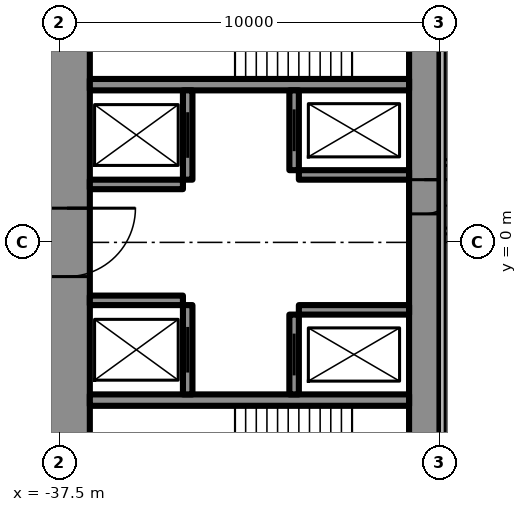
"""IFC4 building model, lengths in metres.
Left out: names, types, materials, properties, quantities, classifications, styles, units other than length and angle.
Written with IfcOpenShell. Run it as: python <this file> out.ifc"""

import sys

from ifc_helpers import new_model, si_unit, direction, frame, frame_2d, origin, place, context, subcontext, project, spatial, rectangle, extrude, element, fill, save


model = new_model("IFC4")
c1 = context("Model", 3, precision=1e-05, world=origin(), true_north=direction((0.0, 1.0)))
c2 = subcontext(c1, "Body", "Model", "MODEL_VIEW")
j1 = project(units=[si_unit("LENGTHUNIT", "METRE"), si_unit("PLANEANGLEUNIT", "RADIAN")], contexts=[c1])
p1 = place(None, origin())
s1 = spatial("IfcSite", under=j1, at=p1, CompositionType="ELEMENT")
p2 = place(p1, origin())
s2 = spatial("IfcBuilding", under=s1, at=p2, CompositionType="ELEMENT")
p3 = place(p2, frame((0.0, 0.0, 247.7)))
s3 = spatial("IfcBuildingStorey", under=s2, at=p3, CompositionType="ELEMENT", Elevation=247.7)
p4 = place(p3, frame((-27.9, 8.6, 0.0), z_axis=(0.0, 0.0, 1.0), x_axis=(0.0, -1.0, 0.0)))
e1 = element("IfcWall", 1, at=p4, inside=s3, PredefinedType="SHEAR", context=c2, shape_type="SweptSolid", body=[
    extrude(rectangle(XDim=17.2, YDim=0.8, at=frame_2d((8.6, 0.0))), origin(), (0.0, 0.0, 1.0), 4.2),
])
p5 = place(p4, frame((6.95, 0.0, 0.0)))
e2 = element("IfcOpeningElement", 2, at=p5, cuts=e1, PredefinedType="OPENING", context=c2, shape_type="SweptSolid", body=[
    extrude(rectangle(XDim=0.9, YDim=2.2, at=frame_2d((0.45, 1.1))), frame((0.0, 0.41, 0.0), z_axis=(0.0, -1.0, 0.0), x_axis=(1.0, 0.0, 0.0)), (0.0, 0.0, 1.0), 0.82),
])
p6 = place(p3, frame((-37.3, 8.6, 0.0), z_axis=(0.0, 0.0, 1.0), x_axis=(0.0, -1.0, 0.0)))
e3 = element("IfcWall", 3, at=p6, inside=s3, PredefinedType="SHEAR", context=c2, shape_type="SweptSolid", body=[
    extrude(rectangle(XDim=17.2, YDim=1.2, at=frame_2d((8.6, 0.0))), origin(), (0.0, 0.0, 1.0), 4.2),
])
p7 = place(p6, frame((7.7, 0.0, 0.0)))
e4 = element("IfcOpeningElement", 4, at=p7, cuts=e3, PredefinedType="OPENING", context=c2, shape_type="SweptSolid", body=[
    extrude(rectangle(XDim=1.8, YDim=2.2, at=frame_2d((0.9, 1.1))), frame((0.0, 0.61, 0.0), z_axis=(0.0, -1.0, 0.0), x_axis=(1.0, 0.0, 0.0)), (0.0, 0.0, 1.0), 1.22),
])
for number, where, z_axis, x_axis in (
    (5, (-28.3, 4.15, 0.0), (0.0, 0.0, 1.0), (-1.0, 0.0, 0.0)),
    (6, (-28.3, -4.15, 0.0), (0.0, 0.0, 1.0), (-1.0, 0.0, 0.0)),
):
    element("IfcWall", number, at=place(p3, frame(where, z_axis=z_axis, x_axis=x_axis)), inside=s3, PredefinedType="SHEAR", context=c2, shape_type="SweptSolid", body=[
        extrude(rectangle(XDim=8.4, YDim=0.3, at=frame_2d((4.2, 0.0))), origin(), (0.0, 0.0, 1.0), 4.2),
    ])
p8 = place(p3, frame((-31.325, 4.0, 0.0), z_axis=(0.0, 0.0, 1.0), x_axis=(0.0, -1.0, 0.0)))
e7 = element("IfcWall", 7, at=p8, inside=s3, PredefinedType="SHEAR", context=c2, shape_type="SweptSolid", body=[
    extrude(rectangle(XDim=2.1, YDim=0.25, at=frame_2d((1.05, 0.0))), origin(), (0.0, 0.0, 1.0), 4.2),
])
p9 = place(p8, frame((0.5, 0.0, 0.0)))
e8 = element("IfcOpeningElement", 8, at=p9, cuts=e7, PredefinedType="OPENING", context=c2, shape_type="SweptSolid", body=[
    extrude(rectangle(XDim=1.1, YDim=2.2, at=frame_2d((0.55, 1.1))), frame((0.0, 0.135, 0.0), z_axis=(0.0, -1.0, 0.0), x_axis=(1.0, 0.0, 0.0)), (0.0, 0.0, 1.0), 0.27),
])
p10 = place(p3, frame((-34.125, 4.0, 0.0), z_axis=(0.0, 0.0, 1.0), x_axis=(0.0, -1.0, 0.0)))
e9 = element("IfcWall", 9, at=p10, inside=s3, PredefinedType="SHEAR", context=c2, shape_type="SweptSolid", body=[
    extrude(rectangle(XDim=2.35, YDim=0.25, at=frame_2d((1.175, 0.0))), origin(), (0.0, 0.0, 1.0), 4.2),
])
p11 = place(p10, frame((0.575, 0.0, 0.0)))
e10 = element("IfcOpeningElement", 10, at=p11, cuts=e9, PredefinedType="OPENING", context=c2, shape_type="SweptSolid", body=[
    extrude(rectangle(XDim=1.2, YDim=2.2, at=frame_2d((0.6, 1.1))), frame((0.0, 0.135, 0.0), z_axis=(0.0, -1.0, 0.0), x_axis=(1.0, 0.0, 0.0)), (0.0, 0.0, 1.0), 0.27),
])
p12 = place(p3, frame((-28.3, 1.775, 0.0), z_axis=(0.0, 0.0, 1.0), x_axis=(-1.0, 0.0, 0.0)))
e11 = element("IfcWall", 11, at=p12, inside=s3, PredefinedType="SHEAR", context=c2, shape_type="SweptSolid", body=[
    extrude(rectangle(XDim=2.9, YDim=0.25, at=frame_2d((1.45, 0.0))), origin(), (0.0, 0.0, 1.0), 4.2),
])
p13 = place(p3, frame((-34.25, 1.525, 0.0), z_axis=(0.0, 0.0, 1.0), x_axis=(-1.0, 0.0, 0.0)))
e12 = element("IfcWall", 12, at=p13, inside=s3, PredefinedType="SHEAR", context=c2, shape_type="SweptSolid", body=[
    extrude(rectangle(XDim=2.45, YDim=0.25, at=frame_2d((1.225, 0.0))), origin(), (0.0, 0.0, 1.0), 4.2),
])
p14 = place(p3, frame((-31.325, -1.9, 0.0), z_axis=(0.0, 0.0, 1.0), x_axis=(0.0, -1.0, 0.0)))
e13 = element("IfcWall", 13, at=p14, inside=s3, PredefinedType="SHEAR", context=c2, shape_type="SweptSolid", body=[
    extrude(rectangle(XDim=2.1, YDim=0.25, at=frame_2d((1.05, 0.0))), origin(), (0.0, 0.0, 1.0), 4.2),
])
p15 = place(p14, frame((0.5, 0.0, 0.0)))
e14 = element("IfcOpeningElement", 14, at=p15, cuts=e13, PredefinedType="OPENING", context=c2, shape_type="SweptSolid", body=[
    extrude(rectangle(XDim=1.1, YDim=2.2, at=frame_2d((0.55, 1.1))), frame((0.0, 0.135, 0.0), z_axis=(0.0, -1.0, 0.0), x_axis=(1.0, 0.0, 0.0)), (0.0, 0.0, 1.0), 0.27),
])
p16 = place(p3, frame((-34.125, -1.65, 0.0), z_axis=(0.0, 0.0, 1.0), x_axis=(0.0, -1.0, 0.0)))
e15 = element("IfcWall", 15, at=p16, inside=s3, PredefinedType="SHEAR", context=c2, shape_type="SweptSolid", body=[
    extrude(rectangle(XDim=2.35, YDim=0.25, at=frame_2d((1.175, 0.0))), origin(), (0.0, 0.0, 1.0), 4.2),
])
p17 = place(p16, frame((0.575, 0.0, 0.0)))
e16 = element("IfcOpeningElement", 16, at=p17, cuts=e15, PredefinedType="OPENING", context=c2, shape_type="SweptSolid", body=[
    extrude(rectangle(XDim=1.2, YDim=2.2, at=frame_2d((0.6, 1.1))), frame((0.0, 0.135, 0.0), z_axis=(0.0, -1.0, 0.0), x_axis=(1.0, 0.0, 0.0)), (0.0, 0.0, 1.0), 0.27),
])
p18 = place(p3, frame((-28.3, -1.775, 0.0), z_axis=(0.0, 0.0, 1.0), x_axis=(-1.0, 0.0, 0.0)))
e17 = element("IfcWall", 17, at=p18, inside=s3, PredefinedType="SHEAR", context=c2, shape_type="SweptSolid", body=[
    extrude(rectangle(XDim=2.9, YDim=0.25, at=frame_2d((1.45, 0.0))), origin(), (0.0, 0.0, 1.0), 4.2),
])
p19 = place(p3, frame((-34.25, -1.525, 0.0), z_axis=(0.0, 0.0, 1.0), x_axis=(-1.0, 0.0, 0.0)))
e18 = element("IfcWall", 18, at=p19, inside=s3, PredefinedType="SHEAR", context=c2, shape_type="SweptSolid", body=[
    extrude(rectangle(XDim=2.45, YDim=0.25, at=frame_2d((1.225, 0.0))), origin(), (0.0, 0.0, 1.0), 4.2),
])
p20 = place(p3, frame((-27.2, 14.3, 0.0), z_axis=(0.0, 0.0, 1.0), x_axis=(-0.866026593062, -0.499997940104, 0.0)))
e19 = element("IfcWall", 19, at=p20, inside=s3, PredefinedType="SHEAR", context=c2, shape_type="SweptSolid", body=[
    extrude(rectangle(XDim=28.946, YDim=1.2, at=frame_2d((14.473, 0.0))), origin(), (0.0, 0.0, 1.0), 4.2),
])
p21 = place(p20, frame((4.6, 0.0, 0.0)))
e20 = element("IfcOpeningElement", 20, at=p21, cuts=e19, PredefinedType="OPENING", context=c2, shape_type="SweptSolid", body=[
    extrude(rectangle(XDim=1.0, YDim=2.2, at=frame_2d((0.5, 1.1))), frame((0.0, 0.61, 0.0), z_axis=(0.0, -1.0, 0.0), x_axis=(1.0, 0.0, 0.0)), (0.0, 0.0, 1.0), 1.22),
])
p22 = place(p20, frame((13.395, 0.0, 0.0)))
e21 = element("IfcOpeningElement", 21, at=p22, cuts=e19, PredefinedType="OPENING", context=c2, shape_type="SweptSolid", body=[
    extrude(rectangle(XDim=1.8, YDim=2.2, at=frame_2d((0.9, 1.1))), frame((0.0, 0.61, 0.0), z_axis=(0.0, -1.0, 0.0), x_axis=(1.0, 0.0, 0.0)), (0.0, 0.0, 1.0), 1.22),
])
p23 = place(p3, frame((-27.2, -14.3, 0.0), z_axis=(0.0, 0.0, 1.0), x_axis=(-0.866024021859, 0.500002393557, 0.0)))
e22 = element("IfcWall", 22, at=p23, inside=s3, PredefinedType="SHEAR", context=c2, shape_type="SweptSolid", body=[
    extrude(rectangle(XDim=27.907, YDim=1.2, at=frame_2d((13.954, 0.0))), origin(), (0.0, 0.0, 1.0), 4.2),
])
p24 = place(p23, frame((4.6, 0.0, 0.0)))
e23 = element("IfcOpeningElement", 23, at=p24, cuts=e22, PredefinedType="OPENING", context=c2, shape_type="SweptSolid", body=[
    extrude(rectangle(XDim=1.0, YDim=2.2, at=frame_2d((0.5, 1.1))), frame((0.0, 0.61, 0.0), z_axis=(0.0, -1.0, 0.0), x_axis=(1.0, 0.0, 0.0)), (0.0, 0.0, 1.0), 1.22),
])
p25 = place(p23, frame((13.395, 0.0, 0.0)))
e24 = element("IfcOpeningElement", 24, at=p25, cuts=e22, PredefinedType="OPENING", context=c2, shape_type="SweptSolid", body=[
    extrude(rectangle(XDim=1.8, YDim=2.2, at=frame_2d((0.9, 1.1))), frame((0.0, 0.61, 0.0), z_axis=(0.0, -1.0, 0.0), x_axis=(1.0, 0.0, 0.0)), (0.0, 0.0, 1.0), 1.22),
])
p26 = place(p3, frame((-28.681, 16.101, 0.0), z_axis=(0.0, 0.0, 1.0), x_axis=(-0.866024860443, -0.500000941094, 0.0)))
e25 = element("IfcWall", 25, at=p26, inside=s3, PredefinedType="PARTITIONING", context=c2, shape_type="SweptSolid", body=[
    extrude(rectangle(XDim=32.201, YDim=0.2, at=frame_2d((16.101, 0.0))), origin(), (0.0, 0.0, 1.0), 3.95),
])
p27 = place(p26, frame((7.266, 0.0, 0.0)))
e26 = element("IfcOpeningElement", 26, at=p27, cuts=e25, PredefinedType="OPENING", context=c2, shape_type="SweptSolid", body=[
    extrude(rectangle(XDim=1.8, YDim=2.2, at=frame_2d((0.9, 1.1))), frame((0.0, 0.11, 0.0), z_axis=(0.0, -1.0, 0.0), x_axis=(1.0, 0.0, 0.0)), (0.0, 0.0, 1.0), 0.22),
])
p28 = place(p26, frame((17.281, 0.0, 0.0)))
e27 = element("IfcOpeningElement", 27, at=p28, cuts=e25, PredefinedType="OPENING", context=c2, shape_type="SweptSolid", body=[
    extrude(rectangle(XDim=1.8, YDim=2.2, at=frame_2d((0.9, 1.1))), frame((0.0, 0.11, 0.0), z_axis=(0.0, -1.0, 0.0), x_axis=(1.0, 0.0, 0.0)), (0.0, 0.0, 1.0), 0.22),
])
p29 = place(p26, frame((21.43, 0.0, 0.0)))
e28 = element("IfcOpeningElement", 28, at=p29, cuts=e25, PredefinedType="OPENING", context=c2, shape_type="SweptSolid", body=[
    extrude(rectangle(XDim=1.8, YDim=2.2, at=frame_2d((0.9, 1.1))), frame((0.0, 0.11, 0.0), z_axis=(0.0, -1.0, 0.0), x_axis=(1.0, 0.0, 0.0)), (0.0, 0.0, 1.0), 0.22),
])
p30 = place(p26, frame((27.29, 0.0, 0.0)))
e29 = element("IfcOpeningElement", 29, at=p30, cuts=e25, PredefinedType="OPENING", context=c2, shape_type="SweptSolid", body=[
    extrude(rectangle(XDim=1.8, YDim=2.2, at=frame_2d((0.9, 1.1))), frame((0.0, 0.11, 0.0), z_axis=(0.0, -1.0, 0.0), x_axis=(1.0, 0.0, 0.0)), (0.0, 0.0, 1.0), 0.22),
])
p31 = place(p3, frame((-27.5, 0.3, 0.0), z_axis=(0.0, 0.0, 1.0), x_axis=(1.0, 0.0, 0.0)))
e30 = element("IfcWall", 30, at=p31, inside=s3, PredefinedType="PARTITIONING", context=c2, shape_type="SweptSolid", body=[
    extrude(rectangle(XDim=55.0, YDim=0.15, at=frame_2d((27.5, 0.0))), origin(), (0.0, 0.0, 1.0), 3.0),
])
p32 = place(p31, frame((1.575, 0.0, 0.0)))
e31 = element("IfcOpeningElement", 31, at=p32, cuts=e30, PredefinedType="OPENING", context=c2, shape_type="SweptSolid", body=[
    extrude(rectangle(XDim=1.0, YDim=2.2, at=frame_2d((0.5, 1.1))), frame((0.0, 0.085, 0.0), z_axis=(0.0, -1.0, 0.0), x_axis=(1.0, 0.0, 0.0)), (0.0, 0.0, 1.0), 0.17),
])
p33 = place(p31, frame((8.525, 0.0, 0.0)))
e32 = element("IfcOpeningElement", 32, at=p33, cuts=e30, PredefinedType="OPENING", context=c2, shape_type="SweptSolid", body=[
    extrude(rectangle(XDim=1.05, YDim=2.4, at=frame_2d((0.525, 1.2))), frame((0.0, 0.085, 0.0), z_axis=(0.0, -1.0, 0.0), x_axis=(1.0, 0.0, 0.0)), (0.0, 0.0, 1.0), 0.17),
])
p34 = place(p31, frame((19.525, 0.0, 0.0)))
e33 = element("IfcOpeningElement", 33, at=p34, cuts=e30, PredefinedType="OPENING", context=c2, shape_type="SweptSolid", body=[
    extrude(rectangle(XDim=1.05, YDim=2.4, at=frame_2d((0.525, 1.2))), frame((0.0, 0.085, 0.0), z_axis=(0.0, -1.0, 0.0), x_axis=(1.0, 0.0, 0.0)), (0.0, 0.0, 1.0), 0.17),
])
p35 = place(p31, frame((25.025, 0.0, 0.0)))
e34 = element("IfcOpeningElement", 34, at=p35, cuts=e30, PredefinedType="OPENING", context=c2, shape_type="SweptSolid", body=[
    extrude(rectangle(XDim=1.05, YDim=2.4, at=frame_2d((0.525, 1.2))), frame((0.0, 0.085, 0.0), z_axis=(0.0, -1.0, 0.0), x_axis=(1.0, 0.0, 0.0)), (0.0, 0.0, 1.0), 0.17),
])
p36 = place(p31, frame((30.525, 0.0, 0.0)))
e35 = element("IfcOpeningElement", 35, at=p36, cuts=e30, PredefinedType="OPENING", context=c2, shape_type="SweptSolid", body=[
    extrude(rectangle(XDim=1.05, YDim=2.4, at=frame_2d((0.525, 1.2))), frame((0.0, 0.085, 0.0), z_axis=(0.0, -1.0, 0.0), x_axis=(1.0, 0.0, 0.0)), (0.0, 0.0, 1.0), 0.17),
])
p37 = place(p31, frame((41.525, 0.0, 0.0)))
e36 = element("IfcOpeningElement", 36, at=p37, cuts=e30, PredefinedType="OPENING", context=c2, shape_type="SweptSolid", body=[
    extrude(rectangle(XDim=1.05, YDim=2.4, at=frame_2d((0.525, 1.2))), frame((0.0, 0.085, 0.0), z_axis=(0.0, -1.0, 0.0), x_axis=(1.0, 0.0, 0.0)), (0.0, 0.0, 1.0), 0.17),
])
p38 = place(p31, frame((52.525, 0.0, 0.0)))
e37 = element("IfcOpeningElement", 37, at=p38, cuts=e30, PredefinedType="OPENING", context=c2, shape_type="SweptSolid", body=[
    extrude(rectangle(XDim=1.05, YDim=2.4, at=frame_2d((0.525, 1.2))), frame((0.0, 0.085, 0.0), z_axis=(0.0, -1.0, 0.0), x_axis=(1.0, 0.0, 0.0)), (0.0, 0.0, 1.0), 0.17),
])
p39 = place(p3, frame((-27.5, 2.1, 0.0), z_axis=(0.0, 0.0, 1.0), x_axis=(1.0, 0.0, 0.0)))
e38 = element("IfcWall", 38, at=p39, inside=s3, PredefinedType="PARTITIONING", context=c2, shape_type="SweptSolid", body=[
    extrude(rectangle(XDim=55.0, YDim=0.15, at=frame_2d((27.5, 0.0))), origin(), (0.0, 0.0, 1.0), 4.0),
])
p40 = place(p39, frame((2.025, 0.0, 0.0)))
e39 = element("IfcOpeningElement", 39, at=p40, cuts=e38, PredefinedType="OPENING", context=c2, shape_type="SweptSolid", body=[
    extrude(rectangle(XDim=1.05, YDim=2.4, at=frame_2d((0.525, 1.2))), frame((0.0, 0.085, 0.0), z_axis=(0.0, -1.0, 0.0), x_axis=(1.0, 0.0, 0.0)), (0.0, 0.0, 1.0), 0.17),
])
p41 = place(p39, frame((8.525, 0.0, 0.0)))
e40 = element("IfcOpeningElement", 40, at=p41, cuts=e38, PredefinedType="OPENING", context=c2, shape_type="SweptSolid", body=[
    extrude(rectangle(XDim=1.05, YDim=2.4, at=frame_2d((0.525, 1.2))), frame((0.0, 0.085, 0.0), z_axis=(0.0, -1.0, 0.0), x_axis=(1.0, 0.0, 0.0)), (0.0, 0.0, 1.0), 0.17),
])
p42 = place(p39, frame((19.525, 0.0, 0.0)))
e41 = element("IfcOpeningElement", 41, at=p42, cuts=e38, PredefinedType="OPENING", context=c2, shape_type="SweptSolid", body=[
    extrude(rectangle(XDim=1.05, YDim=2.4, at=frame_2d((0.525, 1.2))), frame((0.0, 0.085, 0.0), z_axis=(0.0, -1.0, 0.0), x_axis=(1.0, 0.0, 0.0)), (0.0, 0.0, 1.0), 0.17),
])
p43 = place(p39, frame((30.525, 0.0, 0.0)))
e42 = element("IfcOpeningElement", 42, at=p43, cuts=e38, PredefinedType="OPENING", context=c2, shape_type="SweptSolid", body=[
    extrude(rectangle(XDim=1.05, YDim=2.4, at=frame_2d((0.525, 1.2))), frame((0.0, 0.085, 0.0), z_axis=(0.0, -1.0, 0.0), x_axis=(1.0, 0.0, 0.0)), (0.0, 0.0, 1.0), 0.17),
])
p44 = place(p39, frame((41.525, 0.0, 0.0)))
e43 = element("IfcOpeningElement", 43, at=p44, cuts=e38, PredefinedType="OPENING", context=c2, shape_type="SweptSolid", body=[
    extrude(rectangle(XDim=1.05, YDim=2.4, at=frame_2d((0.525, 1.2))), frame((0.0, 0.085, 0.0), z_axis=(0.0, -1.0, 0.0), x_axis=(1.0, 0.0, 0.0)), (0.0, 0.0, 1.0), 0.17),
])
p45 = place(p39, frame((52.525, 0.0, 0.0)))
e44 = element("IfcOpeningElement", 44, at=p45, cuts=e38, PredefinedType="OPENING", context=c2, shape_type="SweptSolid", body=[
    extrude(rectangle(XDim=1.05, YDim=2.4, at=frame_2d((0.525, 1.2))), frame((0.0, 0.085, 0.0), z_axis=(0.0, -1.0, 0.0), x_axis=(1.0, 0.0, 0.0)), (0.0, 0.0, 1.0), 0.17),
])
p46 = place(p7, origin())
e45 = element("IfcDoor", 45, at=p46, inside=s3, OperationType="DOUBLE_DOOR_SINGLE_SWING", PredefinedType="DOOR", context=c2, shape_type="SweptSolid", body=[
    extrude(rectangle(XDim=1.8, YDim=2.2, at=frame_2d((0.9, 1.1))), frame((0.0, 0.025, 0.0), z_axis=(0.0, -1.0, 0.0), x_axis=(1.0, 0.0, 0.0)), (0.0, 0.0, 1.0), 0.05),
])
fill(e4, e45)
p47 = place(p5, origin())
e46 = element("IfcDoor", 46, at=p47, inside=s3, OperationType="SINGLE_SWING_LEFT", PredefinedType="DOOR", context=c2, shape_type="SweptSolid", body=[
    extrude(rectangle(XDim=0.9, YDim=2.2, at=frame_2d((0.45, 1.1))), frame((0.0, 0.025, 0.0), z_axis=(0.0, -1.0, 0.0), x_axis=(1.0, 0.0, 0.0)), (0.0, 0.0, 1.0), 0.05),
])
fill(e2, e46)
p48 = place(p9, origin())
e47 = element("IfcDoor", 47, at=p48, inside=s3, OperationType="SLIDING_TO_LEFT", PredefinedType="USERDEFINED", context=c2, shape_type="SweptSolid", body=[
    extrude(rectangle(XDim=1.1, YDim=2.2, at=frame_2d((0.55, 1.1))), frame((0.0, 0.025, 0.0), z_axis=(0.0, -1.0, 0.0), x_axis=(1.0, 0.0, 0.0)), (0.0, 0.0, 1.0), 0.05),
])
fill(e8, e47)
p49 = place(p15, origin())
e48 = element("IfcDoor", 48, at=p49, inside=s3, OperationType="SLIDING_TO_LEFT", PredefinedType="USERDEFINED", context=c2, shape_type="SweptSolid", body=[
    extrude(rectangle(XDim=1.1, YDim=2.2, at=frame_2d((0.55, 1.1))), frame((0.0, 0.025, 0.0), z_axis=(0.0, -1.0, 0.0), x_axis=(1.0, 0.0, 0.0)), (0.0, 0.0, 1.0), 0.05),
])
fill(e14, e48)
p50 = place(p11, origin())
e49 = element("IfcDoor", 49, at=p50, inside=s3, OperationType="DOUBLE_DOOR_SLIDING", PredefinedType="USERDEFINED", context=c2, shape_type="SweptSolid", body=[
    extrude(rectangle(XDim=1.2, YDim=2.2, at=frame_2d((0.6, 1.1))), frame((0.0, 0.025, 0.0), z_axis=(0.0, -1.0, 0.0), x_axis=(1.0, 0.0, 0.0)), (0.0, 0.0, 1.0), 0.05),
])
fill(e10, e49)
p51 = place(p17, origin())
e50 = element("IfcDoor", 50, at=p51, inside=s3, OperationType="DOUBLE_DOOR_SLIDING", PredefinedType="USERDEFINED", context=c2, shape_type="SweptSolid", body=[
    extrude(rectangle(XDim=1.2, YDim=2.2, at=frame_2d((0.6, 1.1))), frame((0.0, 0.025, 0.0), z_axis=(0.0, -1.0, 0.0), x_axis=(1.0, 0.0, 0.0)), (0.0, 0.0, 1.0), 0.05),
])
fill(e16, e50)
save(model, sys.argv[1])
